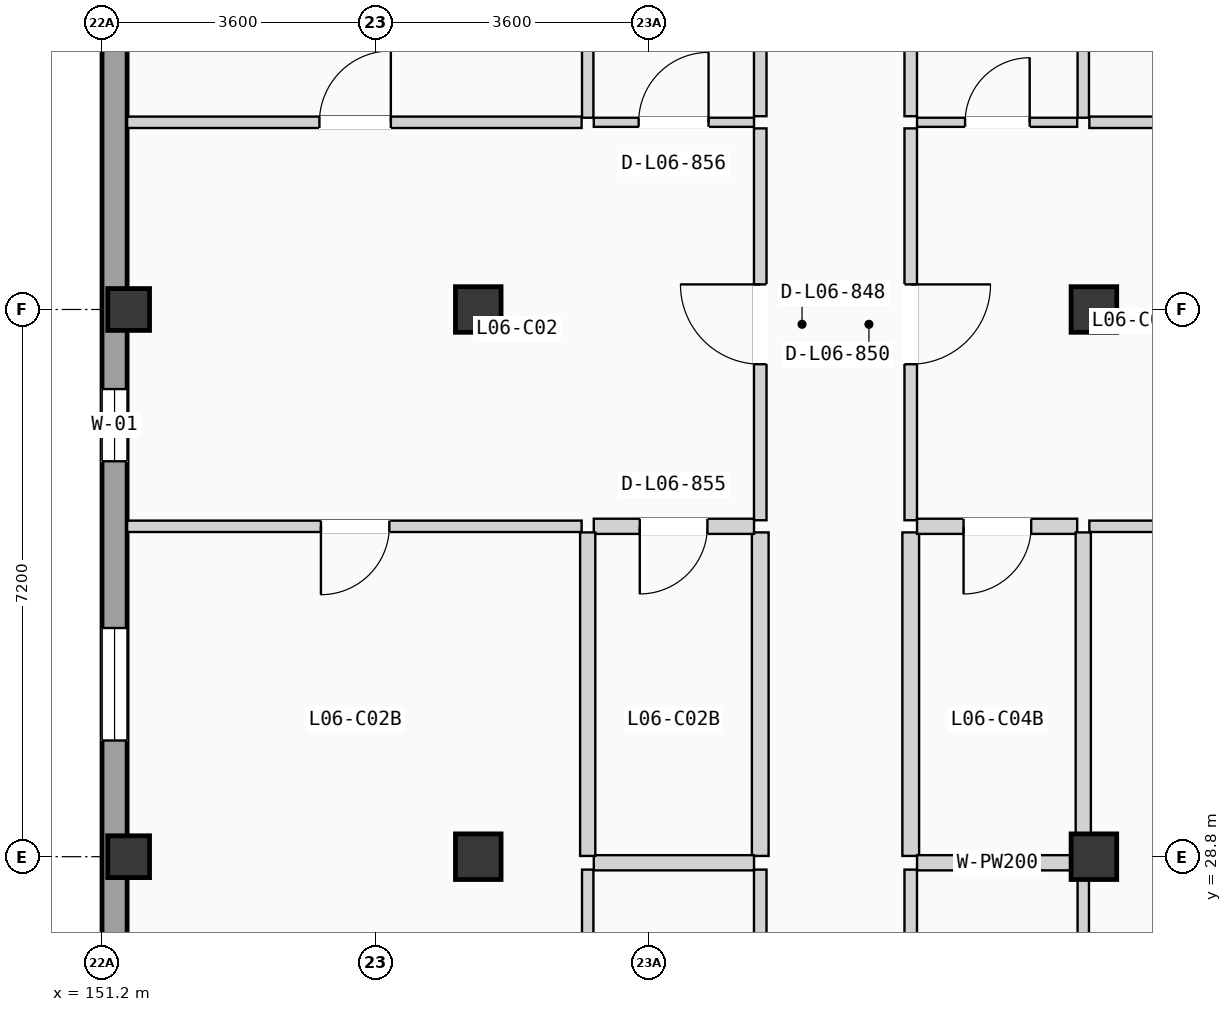
"""IFC4 building model, lengths in metres.
Left out: names, types, materials, properties, quantities, classifications, styles, units other than length and angle.
Written with IfcOpenShell. Run it as: python <this file> out.ifc"""

import sys

from ifc_helpers import new_model, si_unit, direction, frame, frame_2d, origin, origin_2d, place, context, subcontext, project, spatial, rectangle, extrude, element, fill, save


model = new_model("IFC4")
c1 = context("Model", 3, precision=1e-05, world=origin(), true_north=direction((0.0, 1.0)))
c2 = subcontext(c1, "Body", "Model", "MODEL_VIEW")
j1 = project(units=[si_unit("LENGTHUNIT", "METRE"), si_unit("PLANEANGLEUNIT", "RADIAN")], contexts=[c1])
p1 = place(None, origin())
s1 = spatial("IfcSite", under=j1, at=p1, CompositionType="ELEMENT")
p2 = place(p1, origin())
s2 = spatial("IfcBuilding", under=s1, at=p2, CompositionType="ELEMENT")
p3 = place(p2, frame((0.0, 0.0, 21.525)))
s3 = spatial("IfcBuildingStorey", under=s2, at=p3, CompositionType="ELEMENT", Elevation=21.525)
for number, where, z_axis, x_axis in (
    (1, (151.55, 28.8, 0.0), (0.0, 0.0, 1.0), (1.0, 0.0, 0.0)),
    (2, (151.55, 36.0, 0.0), (0.0, 0.0, 1.0), (1.0, 0.0, 0.0)),
):
    element("IfcColumn", number, at=place(p3, frame(where, z_axis=z_axis, x_axis=x_axis)), inside=s3, PredefinedType="COLUMN", context=c2, shape_type="SweptSolid", body=[
        extrude(rectangle(XDim=0.55, YDim=0.55, at=origin_2d()), origin(), (0.0, 0.0, 1.0), 3.15),
    ])
for number, where, z_axis, x_axis in (
    (3, (156.15, 28.8, 0.0), (0.0, 0.0, 1.0), (1.0, 0.0, 0.0)),
    (4, (156.15, 36.0, 0.0), (0.0, 0.0, 1.0), (1.0, 0.0, 0.0)),
    (5, (164.25, 28.8, 0.0), (0.0, 0.0, 1.0), (1.0, 0.0, 0.0)),
    (6, (164.25, 36.0, 0.0), (0.0, 0.0, 1.0), (1.0, 0.0, 0.0)),
):
    element("IfcColumn", number, at=place(p3, frame(where, z_axis=z_axis, x_axis=x_axis)), inside=s3, PredefinedType="COLUMN", context=c2, shape_type="SweptSolid", body=[
        extrude(rectangle(XDim=0.6, YDim=0.6, at=origin_2d()), origin(), (0.0, 0.0, 1.0), 3.15),
    ])
p4 = place(p3, frame((151.365, 0.33, 0.0), z_axis=(0.0, 0.0, 1.0), x_axis=(0.0, 1.0, 0.0)))
e7 = element("IfcWall", 7, at=p4, inside=s3, PredefinedType="SOLIDWALL", context=c2, shape_type="SweptSolid", body=[
    extrude(rectangle(XDim=49.74, YDim=0.33, at=frame_2d((24.87, 0.0))), origin(), (0.0, 0.0, 1.0), 2.89),
])
p5 = place(p4, frame((16.995, 0.0, 0.855)))
e8 = element("IfcOpeningElement", 8, at=p5, cuts=e7, PredefinedType="OPENING", context=c2, shape_type="SweptSolid", body=[
    extrude(rectangle(XDim=1.35, YDim=1.35, at=frame_2d((0.675, 0.675))), frame((0.0, 0.175, 0.0), z_axis=(0.0, -1.0, 0.0), x_axis=(1.0, 0.0, 0.0)), (0.0, 0.0, 1.0), 0.35),
])
p6 = place(p4, frame((9.48, 0.0, 0.705)))
e9 = element("IfcOpeningElement", 9, at=p6, cuts=e7, PredefinedType="OPENING", context=c2, shape_type="SweptSolid", body=[
    extrude(rectangle(XDim=1.35, YDim=1.5, at=frame_2d((0.675, 0.75))), frame((0.0, 0.175, 0.0), z_axis=(0.0, -1.0, 0.0), x_axis=(1.0, 0.0, 0.0)), (0.0, 0.0, 1.0), 0.35),
])
p7 = place(p4, frame((24.597, 0.0, 0.555)))
e10 = element("IfcOpeningElement", 10, at=p7, cuts=e7, PredefinedType="OPENING", context=c2, shape_type="SweptSolid", body=[
    extrude(rectangle(XDim=1.35, YDim=1.65, at=frame_2d((0.675, 0.825))), frame((0.0, 0.175, 0.0), z_axis=(0.0, -1.0, 0.0), x_axis=(1.0, 0.0, 0.0)), (0.0, 0.0, 1.0), 0.35),
])
p8 = place(p4, frame((33.673, 0.0, 0.85)))
e11 = element("IfcOpeningElement", 11, at=p8, cuts=e7, PredefinedType="OPENING", context=c2, shape_type="SweptSolid", body=[
    extrude(rectangle(XDim=0.95, YDim=1.2, at=frame_2d((0.475, 0.6))), frame((0.0, 0.175, 0.0), z_axis=(0.0, -1.0, 0.0), x_axis=(1.0, 0.0, 0.0)), (0.0, 0.0, 1.0), 0.35),
])
p9 = place(p4, frame((29.999, 0.0, 0.9)))
e12 = element("IfcOpeningElement", 12, at=p9, cuts=e7, PredefinedType="OPENING", context=c2, shape_type="SweptSolid", body=[
    extrude(rectangle(XDim=1.48, YDim=1.2, at=frame_2d((0.74, 0.6))), frame((0.0, 0.175, 0.0), z_axis=(0.0, -1.0, 0.0), x_axis=(1.0, 0.0, 0.0)), (0.0, 0.0, 1.0), 0.35),
])
p10 = place(p4, frame((39.601, 0.0, 0.855)))
e13 = element("IfcOpeningElement", 13, at=p10, cuts=e7, PredefinedType="OPENING", context=c2, shape_type="SweptSolid", body=[
    extrude(rectangle(XDim=1.48, YDim=1.35, at=frame_2d((0.74, 0.675))), frame((0.0, 0.175, 0.0), z_axis=(0.0, -1.0, 0.0), x_axis=(1.0, 0.0, 0.0)), (0.0, 0.0, 1.0), 0.35),
])
p11 = place(p3, frame((159.86, 22.674, 0.0), z_axis=(0.0, 0.0, 1.0), x_axis=(0.0, 1.0, 0.0)))
e14 = element("IfcWall", 14, at=p11, inside=s3, PredefinedType="PARTITIONING", context=c2, shape_type="SweptSolid", body=[
    extrude(rectangle(XDim=5.956, YDim=0.165, at=frame_2d((2.978, 0.0))), origin(), (0.0, 0.0, 1.0), 2.87),
])
p12 = place(p3, frame((159.86, 33.227, 0.0), z_axis=(0.0, 0.0, 1.0), x_axis=(0.0, 1.0, 0.0)))
e15 = element("IfcWall", 15, at=p12, inside=s3, PredefinedType="PARTITIONING", context=c2, shape_type="SweptSolid", body=[
    extrude(rectangle(XDim=5.156, YDim=0.165, at=frame_2d((2.578, 0.0))), origin(), (0.0, 0.0, 1.0), 2.87),
])
p13 = place(p12, frame((2.053, 0.0, 0.0)))
e16 = element("IfcOpeningElement", 16, at=p13, cuts=e15, PredefinedType="OPENING", context=c2, shape_type="SweptSolid", body=[
    extrude(rectangle(XDim=1.05, YDim=2.13, at=frame_2d((0.525, 1.065))), frame((0.0, 0.093, 0.0), z_axis=(0.0, -1.0, 0.0), x_axis=(1.0, 0.0, 0.0)), (0.0, 0.0, 1.0), 0.185),
])
p14 = place(p3, frame((159.86, 28.81, 0.0), z_axis=(0.0, 0.0, 1.0), x_axis=(0.0, 1.0, 0.0)))
e17 = element("IfcWall", 17, at=p14, inside=s3, PredefinedType="PLUMBINGWALL", context=c2, shape_type="SweptSolid", body=[
    extrude(rectangle(XDim=4.257, YDim=0.22, at=frame_2d((2.128, 0.0))), origin(), (0.0, 0.0, 1.0), 2.87),
])
p15 = place(p3, frame((159.86, 38.543, 0.0), z_axis=(0.0, 0.0, 1.0), x_axis=(0.0, 1.0, 0.0)))
e18 = element("IfcWall", 18, at=p15, inside=s3, PredefinedType="PARTITIONING", context=c2, shape_type="SweptSolid", body=[
    extrude(rectangle(XDim=4.257, YDim=0.165, at=frame_2d((2.128, 0.0))), origin(), (0.0, 0.0, 1.0), 2.87),
])
p16 = place(p3, frame((161.84, 22.63, 0.0), z_axis=(0.0, 0.0, 1.0), x_axis=(0.0, 1.0, 0.0)))
e19 = element("IfcWall", 19, at=p16, inside=s3, PredefinedType="PARTITIONING", context=c2, shape_type="SweptSolid", body=[
    extrude(rectangle(XDim=6.0, YDim=0.165, at=frame_2d((3.0, 0.0))), origin(), (0.0, 0.0, 1.0), 2.87),
])
p17 = place(p3, frame((161.84, 33.227, 0.0), z_axis=(0.0, 0.0, 1.0), x_axis=(0.0, 1.0, 0.0)))
e20 = element("IfcWall", 20, at=p17, inside=s3, PredefinedType="PARTITIONING", context=c2, shape_type="SweptSolid", body=[
    extrude(rectangle(XDim=5.156, YDim=0.165, at=frame_2d((2.578, 0.0))), origin(), (0.0, 0.0, 1.0), 2.87),
])
p18 = place(p17, frame((2.053, 0.0, 0.0)))
e21 = element("IfcOpeningElement", 21, at=p18, cuts=e20, PredefinedType="OPENING", context=c2, shape_type="SweptSolid", body=[
    extrude(rectangle(XDim=1.05, YDim=2.13, at=frame_2d((0.525, 1.065))), frame((0.0, 0.093, 0.0), z_axis=(0.0, -1.0, 0.0), x_axis=(1.0, 0.0, 0.0)), (0.0, 0.0, 1.0), 0.185),
])
p19 = place(p3, frame((161.84, 28.81, 0.0), z_axis=(0.0, 0.0, 1.0), x_axis=(0.0, 1.0, 0.0)))
e22 = element("IfcWall", 22, at=p19, inside=s3, PredefinedType="PLUMBINGWALL", context=c2, shape_type="SweptSolid", body=[
    extrude(rectangle(XDim=4.257, YDim=0.22, at=frame_2d((2.128, 0.0))), origin(), (0.0, 0.0, 1.0), 2.87),
])
p20 = place(p3, frame((161.84, 38.543, 0.0), z_axis=(0.0, 0.0, 1.0), x_axis=(0.0, 1.0, 0.0)))
e23 = element("IfcWall", 23, at=p20, inside=s3, PredefinedType="PARTITIONING", context=c2, shape_type="SweptSolid", body=[
    extrude(rectangle(XDim=4.257, YDim=0.165, at=frame_2d((2.128, 0.0))), origin(), (0.0, 0.0, 1.0), 2.87),
])
p21 = place(p3, frame((157.59, 22.654, 0.0), z_axis=(0.0, 0.0, 1.0), x_axis=(0.0, 1.0, 0.0)))
e24 = element("IfcWall", 24, at=p21, inside=s3, PredefinedType="PARTITIONING", context=c2, shape_type="SweptSolid", body=[
    extrude(rectangle(XDim=5.976, YDim=0.15, at=frame_2d((2.988, 0.0))), origin(), (0.0, 0.0, 1.0), 2.87),
])
p22 = place(p3, frame((157.67, 28.72, 0.0), z_axis=(0.0, 0.0, 1.0), x_axis=(1.0, 0.0, 0.0)))
e25 = element("IfcWall", 25, at=p22, inside=s3, PredefinedType="PLUMBINGWALL", context=c2, shape_type="SweptSolid", body=[
    extrude(rectangle(XDim=2.108, YDim=0.2, at=frame_2d((1.054, 0.0))), origin(), (0.0, 0.0, 1.0), 2.16),
])
p23 = place(p3, frame((157.67, 33.147, 0.0), z_axis=(0.0, 0.0, 1.0), x_axis=(1.0, 0.0, 0.0)))
e26 = element("IfcWall", 26, at=p23, inside=s3, PredefinedType="PLUMBINGWALL", context=c2, shape_type="SweptSolid", body=[
    extrude(rectangle(XDim=2.108, YDim=0.2, at=frame_2d((1.054, 0.0))), origin(), (0.0, 0.0, 1.0), 2.87),
])
p24 = place(p23, frame((0.605, 0.0, 0.0)))
e27 = element("IfcOpeningElement", 27, at=p24, cuts=e26, PredefinedType="OPENING", context=c2, shape_type="SweptSolid", body=[
    extrude(rectangle(XDim=0.89, YDim=2.03, at=frame_2d((0.445, 1.015))), frame((0.0, 0.11, 0.0), z_axis=(0.0, -1.0, 0.0), x_axis=(1.0, 0.0, 0.0)), (0.0, 0.0, 1.0), 0.22),
])
p25 = place(p3, frame((157.67, 38.463, 0.0), z_axis=(0.0, 0.0, 1.0), x_axis=(1.0, 0.0, 0.0)))
e28 = element("IfcWall", 28, at=p25, inside=s3, PredefinedType="PARTITIONING", context=c2, shape_type="SweptSolid", body=[
    extrude(rectangle(XDim=2.108, YDim=0.12, at=frame_2d((1.054, 0.0))), origin(), (0.0, 0.0, 1.0), 2.87),
])
p26 = place(p25, frame((0.59, 0.0, 0.0)))
e29 = element("IfcOpeningElement", 29, at=p26, cuts=e28, PredefinedType="OPENING", context=c2, shape_type="SweptSolid", body=[
    extrude(rectangle(XDim=0.92, YDim=2.02, at=frame_2d((0.46, 1.01))), frame((0.0, 0.07, 0.0), z_axis=(0.0, -1.0, 0.0), x_axis=(1.0, 0.0, 0.0)), (0.0, 0.0, 1.0), 0.14),
])
p27 = place(p3, frame((151.53, 33.147, 0.0), z_axis=(0.0, 0.0, 1.0), x_axis=(1.0, 0.0, 0.0)))
e30 = element("IfcWall", 30, at=p27, inside=s3, PredefinedType="PARTITIONING", context=c2, shape_type="SweptSolid", body=[
    extrude(rectangle(XDim=5.98, YDim=0.15, at=frame_2d((2.99, 0.0))), origin(), (0.0, 0.0, 1.0), 2.87),
])
p28 = place(p27, frame((2.55, 0.0, 0.0)))
e31 = element("IfcOpeningElement", 31, at=p28, cuts=e30, PredefinedType="OPENING", context=c2, shape_type="SweptSolid", body=[
    extrude(rectangle(XDim=0.9, YDim=2.04, at=frame_2d((0.45, 1.02))), frame((0.0, 0.085, 0.0), z_axis=(0.0, -1.0, 0.0), x_axis=(1.0, 0.0, 0.0)), (0.0, 0.0, 1.0), 0.17),
])
p29 = place(p3, frame((151.53, 38.463, 0.0), z_axis=(0.0, 0.0, 1.0), x_axis=(1.0, 0.0, 0.0)))
e32 = element("IfcWall", 32, at=p29, inside=s3, PredefinedType="PARTITIONING", context=c2, shape_type="SweptSolid", body=[
    extrude(rectangle(XDim=5.98, YDim=0.15, at=frame_2d((2.99, 0.0))), origin(), (0.0, 0.0, 1.0), 2.87),
])
p30 = place(p29, frame((2.53, 0.0, 0.0)))
e33 = element("IfcOpeningElement", 33, at=p30, cuts=e32, PredefinedType="OPENING", context=c2, shape_type="SweptSolid", body=[
    extrude(rectangle(XDim=0.94, YDim=2.06, at=frame_2d((0.47, 1.03))), frame((0.0, 0.085, 0.0), z_axis=(0.0, -1.0, 0.0), x_axis=(1.0, 0.0, 0.0)), (0.0, 0.0, 1.0), 0.17),
])
p31 = place(p3, frame((157.59, 28.81, 0.0), z_axis=(0.0, 0.0, 1.0), x_axis=(0.0, 1.0, 0.0)))
e34 = element("IfcWall", 34, at=p31, inside=s3, PredefinedType="PLUMBINGWALL", context=c2, shape_type="SweptSolid", body=[
    extrude(rectangle(XDim=4.257, YDim=0.2, at=frame_2d((2.128, 0.0))), origin(), (0.0, 0.0, 1.0), 2.87),
])
p32 = place(p3, frame((157.59, 38.523, 0.0), z_axis=(0.0, 0.0, 1.0), x_axis=(0.0, 1.0, 0.0)))
e35 = element("IfcWall", 35, at=p32, inside=s3, PredefinedType="PARTITIONING", context=c2, shape_type="SweptSolid", body=[
    extrude(rectangle(XDim=4.277, YDim=0.15, at=frame_2d((2.139, 0.0))), origin(), (0.0, 0.0, 1.0), 2.87),
])
p33 = place(p3, frame((164.11, 22.61, 0.0), z_axis=(0.0, 0.0, 1.0), x_axis=(0.0, 1.0, 0.0)))
e36 = element("IfcWall", 36, at=p33, inside=s3, PredefinedType="PARTITIONING", context=c2, shape_type="SweptSolid", body=[
    extrude(rectangle(XDim=6.02, YDim=0.15, at=frame_2d((3.01, 0.0))), origin(), (0.0, 0.0, 1.0), 2.87),
])
p34 = place(p3, frame((161.923, 28.72, 0.0), z_axis=(0.0, 0.0, 1.0), x_axis=(1.0, 0.0, 0.0)))
e37 = element("IfcWall", 37, at=p34, inside=s3, PredefinedType="PLUMBINGWALL", context=c2, shape_type="SweptSolid", body=[
    extrude(rectangle(XDim=2.112, YDim=0.2, at=frame_2d((1.056, 0.0))), origin(), (0.0, 0.0, 1.0), 2.16),
])
p35 = place(p3, frame((161.923, 33.147, 0.0), z_axis=(0.0, 0.0, 1.0), x_axis=(1.0, 0.0, 0.0)))
e38 = element("IfcWall", 38, at=p35, inside=s3, PredefinedType="PLUMBINGWALL", context=c2, shape_type="SweptSolid", body=[
    extrude(rectangle(XDim=2.107, YDim=0.2, at=frame_2d((1.053, 0.0))), origin(), (0.0, 0.0, 1.0), 2.87),
])
p36 = place(p35, frame((0.612, 0.0, 0.0)))
e39 = element("IfcOpeningElement", 39, at=p36, cuts=e38, PredefinedType="OPENING", context=c2, shape_type="SweptSolid", body=[
    extrude(rectangle(XDim=0.89, YDim=2.03, at=frame_2d((0.445, 1.015))), frame((0.0, 0.11, 0.0), z_axis=(0.0, -1.0, 0.0), x_axis=(1.0, 0.0, 0.0)), (0.0, 0.0, 1.0), 0.22),
])
p37 = place(p3, frame((161.923, 38.463, 0.0), z_axis=(0.0, 0.0, 1.0), x_axis=(1.0, 0.0, 0.0)))
e40 = element("IfcWall", 40, at=p37, inside=s3, PredefinedType="PARTITIONING", context=c2, shape_type="SweptSolid", body=[
    extrude(rectangle(XDim=2.107, YDim=0.12, at=frame_2d((1.053, 0.0))), origin(), (0.0, 0.0, 1.0), 2.87),
])
p38 = place(p37, frame((0.632, 0.0, 0.0)))
e41 = element("IfcOpeningElement", 41, at=p38, cuts=e40, PredefinedType="OPENING", context=c2, shape_type="SweptSolid", body=[
    extrude(rectangle(XDim=0.85, YDim=2.01, at=frame_2d((0.425, 1.005))), frame((0.0, 0.07, 0.0), z_axis=(0.0, -1.0, 0.0), x_axis=(1.0, 0.0, 0.0)), (0.0, 0.0, 1.0), 0.14),
])
p39 = place(p3, frame((164.19, 33.147, 0.0), z_axis=(0.0, 0.0, 1.0), x_axis=(1.0, 0.0, 0.0)))
e42 = element("IfcWall", 42, at=p39, inside=s3, PredefinedType="PARTITIONING", context=c2, shape_type="SweptSolid", body=[
    extrude(rectangle(XDim=4.68, YDim=0.15, at=frame_2d((2.34, 0.0))), origin(), (0.0, 0.0, 1.0), 2.87),
])
p40 = place(p39, frame((1.88, 0.0, 0.0)))
e43 = element("IfcOpeningElement", 43, at=p40, cuts=e42, PredefinedType="OPENING", context=c2, shape_type="SweptSolid", body=[
    extrude(rectangle(XDim=0.9, YDim=2.04, at=frame_2d((0.45, 1.02))), frame((0.0, 0.085, 0.0), z_axis=(0.0, -1.0, 0.0), x_axis=(1.0, 0.0, 0.0)), (0.0, 0.0, 1.0), 0.17),
])
p41 = place(p3, frame((164.19, 38.463, 0.0), z_axis=(0.0, 0.0, 1.0), x_axis=(1.0, 0.0, 0.0)))
e44 = element("IfcWall", 44, at=p41, inside=s3, PredefinedType="PARTITIONING", context=c2, shape_type="SweptSolid", body=[
    extrude(rectangle(XDim=4.68, YDim=0.15, at=frame_2d((2.34, 0.0))), origin(), (0.0, 0.0, 1.0), 2.87),
])
p42 = place(p41, frame((1.86, 0.0, 0.0)))
e45 = element("IfcOpeningElement", 45, at=p42, cuts=e44, PredefinedType="OPENING", context=c2, shape_type="SweptSolid", body=[
    extrude(rectangle(XDim=0.94, YDim=2.06, at=frame_2d((0.47, 1.03))), frame((0.0, 0.085, 0.0), z_axis=(0.0, -1.0, 0.0), x_axis=(1.0, 0.0, 0.0)), (0.0, 0.0, 1.0), 0.17),
])
p43 = place(p3, frame((164.11, 28.81, 0.0), z_axis=(0.0, 0.0, 1.0), x_axis=(0.0, 1.0, 0.0)))
e46 = element("IfcWall", 46, at=p43, inside=s3, PredefinedType="PLUMBINGWALL", context=c2, shape_type="SweptSolid", body=[
    extrude(rectangle(XDim=4.257, YDim=0.2, at=frame_2d((2.128, 0.0))), origin(), (0.0, 0.0, 1.0), 2.87),
])
p44 = place(p3, frame((164.11, 38.523, 0.0), z_axis=(0.0, 0.0, 1.0), x_axis=(0.0, 1.0, 0.0)))
e47 = element("IfcWall", 47, at=p44, inside=s3, PredefinedType="PARTITIONING", context=c2, shape_type="SweptSolid", body=[
    extrude(rectangle(XDim=4.277, YDim=0.15, at=frame_2d((2.139, 0.0))), origin(), (0.0, 0.0, 1.0), 2.87),
])
p45 = place(p8, origin())
e48 = element("IfcWindow", 48, at=p45, inside=s3, PartitioningType="SINGLE_PANEL", PredefinedType="WINDOW", context=c2, shape_type="SweptSolid", body=[
    extrude(rectangle(XDim=0.95, YDim=1.2, at=frame_2d((0.475, 0.6))), frame((0.0, 0.03, 0.0), z_axis=(0.0, -1.0, 0.0), x_axis=(1.0, 0.0, 0.0)), (0.0, 0.0, 1.0), 0.06),
])
fill(e11, e48)
p46 = place(p9, origin())
e49 = element("IfcWindow", 49, at=p46, inside=s3, PartitioningType="SINGLE_PANEL", PredefinedType="WINDOW", context=c2, shape_type="SweptSolid", body=[
    extrude(rectangle(XDim=1.48, YDim=1.2, at=frame_2d((0.74, 0.6))), frame((0.0, 0.03, 0.0), z_axis=(0.0, -1.0, 0.0), x_axis=(1.0, 0.0, 0.0)), (0.0, 0.0, 1.0), 0.06),
])
fill(e12, e49)
p47 = place(p13, origin())
e50 = element("IfcDoor", 50, at=p47, inside=s3, OperationType="SINGLE_SWING_RIGHT", PredefinedType="DOOR", context=c2, shape_type="SweptSolid", body=[
    extrude(rectangle(XDim=1.05, YDim=2.13, at=frame_2d((0.525, 1.065))), frame((0.0, 0.025, 0.0), z_axis=(0.0, -1.0, 0.0), x_axis=(1.0, 0.0, 0.0)), (0.0, 0.0, 1.0), 0.05),
])
fill(e16, e50)
p48 = place(p18, frame((1.05, 0.0, 0.0), z_axis=(0.0, 0.0, 1.0), x_axis=(-1.0, 0.0, 0.0)))
e51 = element("IfcDoor", 51, at=p48, inside=s3, OperationType="SINGLE_SWING_RIGHT", PredefinedType="DOOR", context=c2, shape_type="SweptSolid", body=[
    extrude(rectangle(XDim=1.05, YDim=2.13, at=frame_2d((0.525, 1.065))), frame((0.0, 0.025, 0.0), z_axis=(0.0, -1.0, 0.0), x_axis=(1.0, 0.0, 0.0)), (0.0, 0.0, 1.0), 0.05),
])
fill(e21, e51)
p49 = place(p24, frame((0.89, 0.0, 0.0), z_axis=(0.0, 0.0, 1.0), x_axis=(-1.0, 0.0, 0.0)))
e52 = element("IfcDoor", 52, at=p49, inside=s3, OperationType="SINGLE_SWING_LEFT", PredefinedType="DOOR", context=c2, shape_type="SweptSolid", body=[
    extrude(rectangle(XDim=0.89, YDim=2.03, at=frame_2d((0.445, 1.015))), frame((0.0, 0.025, 0.0), z_axis=(0.0, -1.0, 0.0), x_axis=(1.0, 0.0, 0.0)), (0.0, 0.0, 1.0), 0.05),
])
fill(e27, e52)
p50 = place(p26, origin())
e53 = element("IfcDoor", 53, at=p50, inside=s3, OperationType="SINGLE_SWING_RIGHT", PredefinedType="DOOR", context=c2, shape_type="SweptSolid", body=[
    extrude(rectangle(XDim=0.92, YDim=2.02, at=frame_2d((0.46, 1.01))), frame((0.0, 0.025, 0.0), z_axis=(0.0, -1.0, 0.0), x_axis=(1.0, 0.0, 0.0)), (0.0, 0.0, 1.0), 0.05),
])
fill(e29, e53)
p51 = place(p28, frame((0.9, 0.0, 0.0), z_axis=(0.0, 0.0, 1.0), x_axis=(-1.0, 0.0, 0.0)))
e54 = element("IfcDoor", 54, at=p51, inside=s3, OperationType="SINGLE_SWING_LEFT", PredefinedType="DOOR", context=c2, shape_type="SweptSolid", body=[
    extrude(rectangle(XDim=0.9, YDim=2.04, at=frame_2d((0.45, 1.02))), frame((0.0, 0.025, 0.0), z_axis=(0.0, -1.0, 0.0), x_axis=(1.0, 0.0, 0.0)), (0.0, 0.0, 1.0), 0.05),
])
fill(e31, e54)
p52 = place(p30, origin())
e55 = element("IfcDoor", 55, at=p52, inside=s3, OperationType="SINGLE_SWING_RIGHT", PredefinedType="DOOR", context=c2, shape_type="SweptSolid", body=[
    extrude(rectangle(XDim=0.94, YDim=2.06, at=frame_2d((0.47, 1.03))), frame((0.0, 0.025, 0.0), z_axis=(0.0, -1.0, 0.0), x_axis=(1.0, 0.0, 0.0)), (0.0, 0.0, 1.0), 0.05),
])
fill(e33, e55)
p53 = place(p36, frame((0.89, 0.0, 0.0), z_axis=(0.0, 0.0, 1.0), x_axis=(-1.0, 0.0, 0.0)))
e56 = element("IfcDoor", 56, at=p53, inside=s3, OperationType="SINGLE_SWING_LEFT", PredefinedType="DOOR", context=c2, shape_type="SweptSolid", body=[
    extrude(rectangle(XDim=0.89, YDim=2.03, at=frame_2d((0.445, 1.015))), frame((0.0, 0.025, 0.0), z_axis=(0.0, -1.0, 0.0), x_axis=(1.0, 0.0, 0.0)), (0.0, 0.0, 1.0), 0.05),
])
fill(e39, e56)
p54 = place(p38, origin())
e57 = element("IfcDoor", 57, at=p54, inside=s3, OperationType="SINGLE_SWING_RIGHT", PredefinedType="DOOR", context=c2, shape_type="SweptSolid", body=[
    extrude(rectangle(XDim=0.85, YDim=2.01, at=frame_2d((0.425, 1.005))), frame((0.0, 0.025, 0.0), z_axis=(0.0, -1.0, 0.0), x_axis=(1.0, 0.0, 0.0)), (0.0, 0.0, 1.0), 0.05),
])
fill(e41, e57)
save(model, sys.argv[1])
